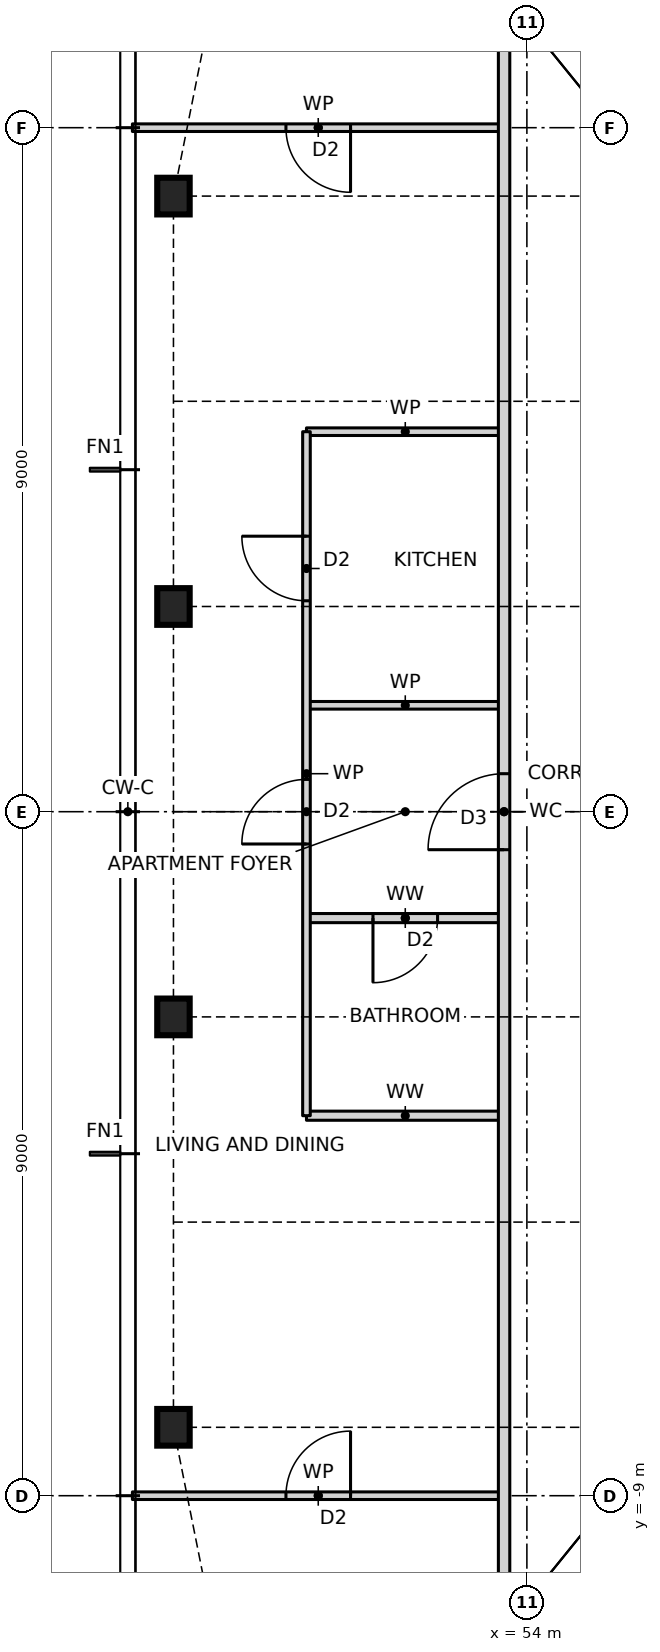
"""IFC4 building model, lengths in metres.
Left out: names, types, materials, properties, quantities, classifications, styles, units other than length and angle.
Written with IfcOpenShell. Run it as: python <this file> out.ifc"""

import sys

from ifc_helpers import new_model, si_unit, direction, frame, frame_2d, origin, origin_2d, place, context, subcontext, project, spatial, rectangle, i_section, extrude, element, fill, save


model = new_model("IFC4")
c1 = context("Model", 3, precision=1e-05, world=origin(), true_north=direction((0.0, 1.0)))
c2 = subcontext(c1, "Body", "Model", "MODEL_VIEW")
j1 = project(units=[si_unit("LENGTHUNIT", "METRE"), si_unit("PLANEANGLEUNIT", "RADIAN")], contexts=[c1])
p1 = place(None, origin())
s1 = spatial("IfcSite", under=j1, at=p1, CompositionType="ELEMENT")
p2 = place(p1, origin())
s2 = spatial("IfcBuilding", under=s1, at=p2, CompositionType="ELEMENT")
p3 = place(p2, frame((0.0, 0.0, 112.0)))
s3 = spatial("IfcBuildingStorey", under=s2, at=p3, CompositionType="ELEMENT", Elevation=112.0)
for number, where, z_axis, x_axis in (
    (1, (49.35, 8.1, 0.0), (0.0, 0.0, 1.0), (1.0, 0.0, 0.0)),
    (2, (49.35, 2.7, 0.0), (0.0, 0.0, 1.0), (1.0, 0.0, 0.0)),
    (3, (49.35, -2.7, 0.0), (0.0, 0.0, 1.0), (1.0, 0.0, 0.0)),
    (4, (49.35, -8.1, 0.0), (0.0, 0.0, 1.0), (1.0, 0.0, 0.0)),
):
    element("IfcColumn", number, at=place(p3, frame(where, z_axis=z_axis, x_axis=x_axis)), inside=s3, PredefinedType="COLUMN", context=c2, shape_type="SweptSolid", body=[
        extrude(i_section(OverallWidth=0.427, OverallDepth=0.483, WebThickness=0.051, FlangeThickness=0.082, at=origin_2d()), origin(), (0.0, 0.0, 1.0), 3.5),
    ])
p4 = place(p3, frame((48.81, -9.0, 0.0), z_axis=(0.0, 0.0, 1.0), x_axis=(1.0, 0.0, 0.0)))
e5 = element("IfcWall", 5, at=p4, inside=s3, PredefinedType="PARTITIONING", context=c2, shape_type="SweptSolid", body=[
    extrude(rectangle(XDim=4.89, YDim=0.1, at=frame_2d((2.445, 0.0))), origin(), (0.0, 0.0, 1.0), 3.27),
])
p5 = place(p4, frame((2.02, 0.0, 0.0)))
e6 = element("IfcOpeningElement", 6, at=p5, cuts=e5, PredefinedType="OPENING", context=c2, shape_type="SweptSolid", body=[
    extrude(rectangle(XDim=0.85, YDim=2.1, at=frame_2d((0.425, 1.05))), frame((0.0, 0.06, 0.0), z_axis=(0.0, -1.0, 0.0), x_axis=(1.0, 0.0, 0.0)), (0.0, 0.0, 1.0), 0.12),
])
p6 = place(p3, frame((51.1, -4.0, 0.0), z_axis=(0.0, 0.0, 1.0), x_axis=(1.0, 0.0, 0.0)))
e7 = element("IfcWall", 7, at=p6, inside=s3, PredefinedType="PARTITIONING", context=c2, shape_type="SweptSolid", body=[
    extrude(rectangle(XDim=2.6, YDim=0.12, at=frame_2d((1.3, 0.0))), origin(), (0.0, 0.0, 1.0), 3.27),
])
p7 = place(p3, frame((51.1, -1.4, 0.0), z_axis=(0.0, 0.0, 1.0), x_axis=(1.0, 0.0, 0.0)))
e8 = element("IfcWall", 8, at=p7, inside=s3, PredefinedType="PARTITIONING", context=c2, shape_type="SweptSolid", body=[
    extrude(rectangle(XDim=2.6, YDim=0.12, at=frame_2d((1.3, 0.0))), origin(), (0.0, 0.0, 1.0), 3.27),
])
p8 = place(p7, frame((0.875, 0.0, 0.0)))
e9 = element("IfcOpeningElement", 9, at=p8, cuts=e8, PredefinedType="OPENING", context=c2, shape_type="SweptSolid", body=[
    extrude(rectangle(XDim=0.85, YDim=2.1, at=frame_2d((0.425, 1.05))), frame((0.0, 0.07, 0.0), z_axis=(0.0, -1.0, 0.0), x_axis=(1.0, 0.0, 0.0)), (0.0, 0.0, 1.0), 0.14),
])
for number, where, z_axis, x_axis in (
    (10, (51.1, 1.4, 0.0), (0.0, 0.0, 1.0), (1.0, 0.0, 0.0)),
    (11, (51.1, 5.0, 0.0), (0.0, 0.0, 1.0), (1.0, 0.0, 0.0)),
):
    element("IfcWall", number, at=place(p3, frame(where, z_axis=z_axis, x_axis=x_axis)), inside=s3, PredefinedType="PARTITIONING", context=c2, shape_type="SweptSolid", body=[
        extrude(rectangle(XDim=2.6, YDim=0.1, at=frame_2d((1.3, 0.0))), origin(), (0.0, 0.0, 1.0), 3.27),
    ])
p9 = place(p3, frame((48.81, 9.0, 0.0), z_axis=(0.0, 0.0, 1.0), x_axis=(1.0, 0.0, 0.0)))
e12 = element("IfcWall", 12, at=p9, inside=s3, PredefinedType="PARTITIONING", context=c2, shape_type="SweptSolid", body=[
    extrude(rectangle(XDim=4.89, YDim=0.1, at=frame_2d((2.445, 0.0))), origin(), (0.0, 0.0, 1.0), 3.27),
])
p10 = place(p9, frame((2.02, 0.0, 0.0)))
e13 = element("IfcOpeningElement", 13, at=p10, cuts=e12, PredefinedType="OPENING", context=c2, shape_type="SweptSolid", body=[
    extrude(rectangle(XDim=0.85, YDim=2.1, at=frame_2d((0.425, 1.05))), frame((0.0, 0.06, 0.0), z_axis=(0.0, -1.0, 0.0), x_axis=(1.0, 0.0, 0.0)), (0.0, 0.0, 1.0), 0.12),
])
p11 = place(p3, frame((53.7, -10.768, 0.0), z_axis=(0.0, 0.0, 1.0), x_axis=(0.0, 1.0, 0.0)))
e14 = element("IfcWall", 14, at=p11, inside=s3, PredefinedType="PARTITIONING", context=c2, shape_type="SweptSolid", body=[
    extrude(rectangle(XDim=21.536, YDim=0.15, at=frame_2d((10.768, 0.0))), origin(), (0.0, 0.0, 1.0), 3.27),
])
p12 = place(p11, frame((10.268, 0.0, 0.0)))
e15 = element("IfcOpeningElement", 15, at=p12, cuts=e14, PredefinedType="OPENING", context=c2, shape_type="SweptSolid", body=[
    extrude(rectangle(XDim=1.0, YDim=2.1, at=frame_2d((0.5, 1.05))), frame((0.0, 0.085, 0.0), z_axis=(0.0, -1.0, 0.0), x_axis=(1.0, 0.0, 0.0)), (0.0, 0.0, 1.0), 0.17),
])
p13 = place(p3, frame((51.1, -4.0, 0.0), z_axis=(0.0, 0.0, 1.0), x_axis=(0.0, 1.0, 0.0)))
e16 = element("IfcWall", 16, at=p13, inside=s3, PredefinedType="PARTITIONING", context=c2, shape_type="SweptSolid", body=[
    extrude(rectangle(XDim=9.0, YDim=0.1, at=frame_2d((4.5, 0.0))), origin(), (0.0, 0.0, 1.0), 3.27),
])
p14 = place(p13, frame((6.775, 0.0, 0.0)))
e17 = element("IfcOpeningElement", 17, at=p14, cuts=e16, PredefinedType="OPENING", context=c2, shape_type="SweptSolid", body=[
    extrude(rectangle(XDim=0.85, YDim=2.1, at=frame_2d((0.425, 1.05))), frame((0.0, 0.06, 0.0), z_axis=(0.0, -1.0, 0.0), x_axis=(1.0, 0.0, 0.0)), (0.0, 0.0, 1.0), 0.12),
])
p15 = place(p13, frame((3.575, 0.0, 0.0)))
e18 = element("IfcOpeningElement", 18, at=p15, cuts=e16, PredefinedType="OPENING", context=c2, shape_type="SweptSolid", body=[
    extrude(rectangle(XDim=0.85, YDim=2.1, at=frame_2d((0.425, 1.05))), frame((0.0, 0.06, 0.0), z_axis=(0.0, -1.0, 0.0), x_axis=(1.0, 0.0, 0.0)), (0.0, 0.0, 1.0), 0.12),
])
p16 = place(p14, origin())
e19 = element("IfcDoor", 19, at=p16, inside=s3, OperationType="SINGLE_SWING_RIGHT", PredefinedType="DOOR", context=c2, shape_type="SweptSolid", body=[
    extrude(rectangle(XDim=0.85, YDim=2.1, at=frame_2d((0.425, 1.05))), frame((0.0, 0.025, 0.0), z_axis=(0.0, -1.0, 0.0), x_axis=(1.0, 0.0, 0.0)), (0.0, 0.0, 1.0), 0.05),
])
fill(e17, e19)
p17 = place(p12, origin())
e20 = element("IfcDoor", 20, at=p17, inside=s3, OperationType="SINGLE_SWING_LEFT", PredefinedType="DOOR", context=c2, shape_type="SweptSolid", body=[
    extrude(rectangle(XDim=1.0, YDim=2.1, at=frame_2d((0.5, 1.05))), frame((0.0, 0.025, 0.0), z_axis=(0.0, -1.0, 0.0), x_axis=(1.0, 0.0, 0.0)), (0.0, 0.0, 1.0), 0.05),
])
fill(e15, e20)
p18 = place(p15, origin())
e21 = element("IfcDoor", 21, at=p18, inside=s3, OperationType="SINGLE_SWING_LEFT", PredefinedType="DOOR", context=c2, shape_type="SweptSolid", body=[
    extrude(rectangle(XDim=0.85, YDim=2.1, at=frame_2d((0.425, 1.05))), frame((0.0, 0.025, 0.0), z_axis=(0.0, -1.0, 0.0), x_axis=(1.0, 0.0, 0.0)), (0.0, 0.0, 1.0), 0.05),
])
fill(e18, e21)
p19 = place(p8, frame((0.85, 0.0, 0.0), z_axis=(0.0, 0.0, 1.0), x_axis=(-1.0, 0.0, 0.0)))
e22 = element("IfcDoor", 22, at=p19, inside=s3, OperationType="SINGLE_SWING_RIGHT", PredefinedType="DOOR", context=c2, shape_type="SweptSolid", body=[
    extrude(rectangle(XDim=0.85, YDim=2.1, at=frame_2d((0.425, 1.05))), frame((0.0, 0.025, 0.0), z_axis=(0.0, -1.0, 0.0), x_axis=(1.0, 0.0, 0.0)), (0.0, 0.0, 1.0), 0.05),
])
fill(e9, e22)
p20 = place(p10, frame((0.85, 0.0, 0.0), z_axis=(0.0, 0.0, 1.0), x_axis=(-1.0, 0.0, 0.0)))
e23 = element("IfcDoor", 23, at=p20, inside=s3, OperationType="SINGLE_SWING_LEFT", PredefinedType="DOOR", context=c2, shape_type="SweptSolid", body=[
    extrude(rectangle(XDim=0.85, YDim=2.1, at=frame_2d((0.425, 1.05))), frame((0.0, 0.025, 0.0), z_axis=(0.0, -1.0, 0.0), x_axis=(1.0, 0.0, 0.0)), (0.0, 0.0, 1.0), 0.05),
])
fill(e13, e23)
p21 = place(p5, origin())
e24 = element("IfcDoor", 24, at=p21, inside=s3, OperationType="SINGLE_SWING_RIGHT", PredefinedType="DOOR", context=c2, shape_type="SweptSolid", body=[
    extrude(rectangle(XDim=0.85, YDim=2.1, at=frame_2d((0.425, 1.05))), frame((0.0, 0.025, 0.0), z_axis=(0.0, -1.0, 0.0), x_axis=(1.0, 0.0, 0.0)), (0.0, 0.0, 1.0), 0.05),
])
fill(e6, e24)
save(model, sys.argv[1])
